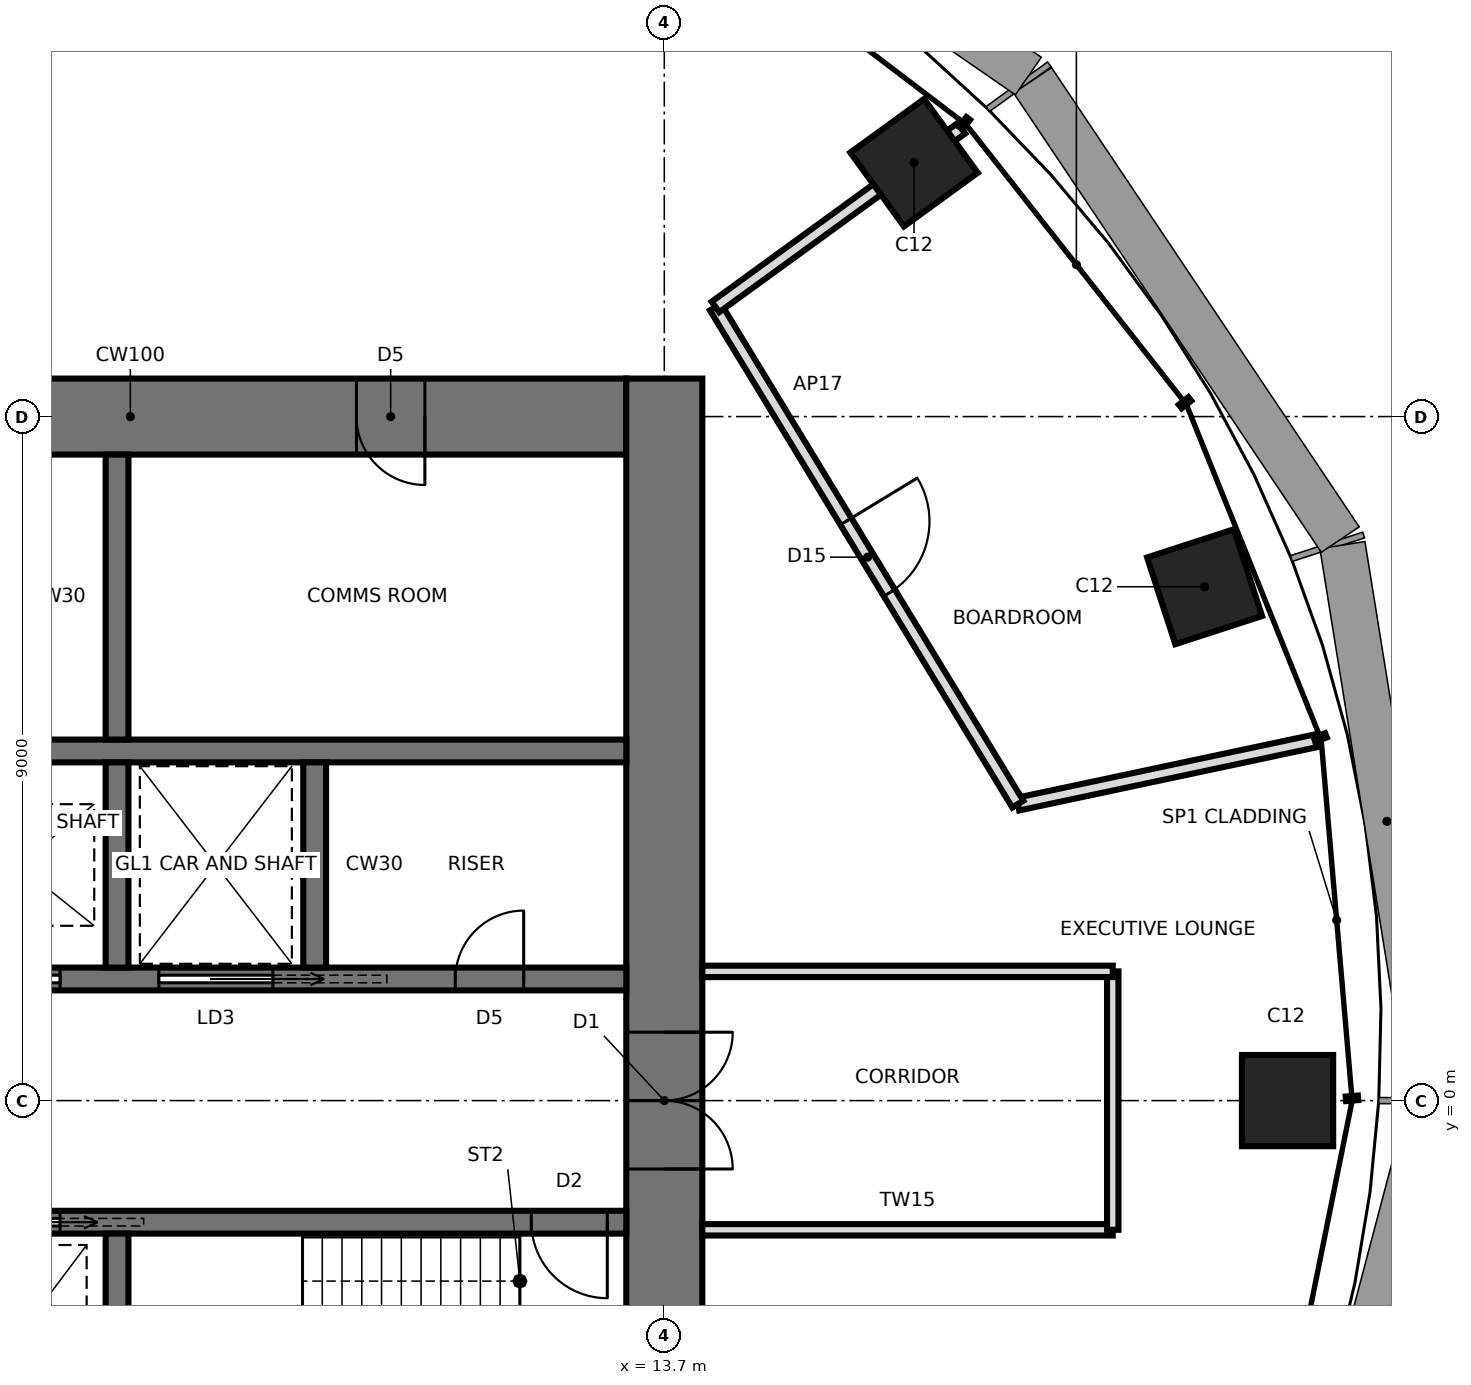
"""IFC4 building model, lengths in metres.
Left out: names, types, materials, properties, quantities, classifications, styles, units other than length and angle.
Written with IfcOpenShell. Run it as: python <this file> out.ifc"""

import sys

from ifc_helpers import new_model, si_unit, direction, frame, frame_2d, origin, origin_2d, place, context, subcontext, project, spatial, rectangle, extrude, element, fill, save


model = new_model("IFC4")
c1 = context("Model", 3, precision=1e-05, world=origin(), true_north=direction((0.0, 1.0)))
c2 = subcontext(c1, "Body", "Model", "MODEL_VIEW")
j1 = project(units=[si_unit("LENGTHUNIT", "METRE"), si_unit("PLANEANGLEUNIT", "RADIAN")], contexts=[c1])
p1 = place(None, origin())
s1 = spatial("IfcSite", under=j1, at=p1, CompositionType="ELEMENT")
p2 = place(p1, origin())
s2 = spatial("IfcBuilding", under=s1, at=p2, CompositionType="ELEMENT")
p3 = place(p2, frame((0.0, 0.0, 256.0)))
s3 = spatial("IfcBuildingStorey", under=s2, at=p3, CompositionType="ELEMENT", Elevation=256.0)
for number, where, z_axis, x_axis in (
    (1, (21.9, 0.0, 0.0), (0.0, 0.0, 1.0), (1.0, 0.0, 0.0)),
    (2, (20.808, 6.761, 0.0), (0.0, 0.0, 1.0), (0.951, 0.309, 0.0)),
    (3, (16.986, 12.341, 0.0), (0.0, 0.0, 1.0), (0.809, 0.588, 0.0)),
):
    element("IfcColumn", number, at=place(p3, frame(where, z_axis=z_axis, x_axis=x_axis)), inside=s3, PredefinedType="COLUMN", context=c2, shape_type="SweptSolid", body=[
        extrude(rectangle(XDim=1.2, YDim=1.2, at=origin_2d()), origin(), (0.0, 0.0, 1.0), 4.2),
    ])
p4 = place(p3, frame((13.2, 9.0, 0.0), z_axis=(0.0, 0.0, 1.0), x_axis=(-1.0, 0.0, 0.0)))
e4 = element("IfcWall", 4, at=p4, inside=s3, PredefinedType="SHEAR", context=c2, shape_type="SweptSolid", body=[
    extrude(rectangle(XDim=26.4, YDim=1.0, at=frame_2d((13.2, 0.0))), origin(), (0.0, 0.0, 1.0), 4.2),
])
p5 = place(p4, frame((2.65, 0.0, 0.0)))
e5 = element("IfcOpeningElement", 5, at=p5, cuts=e4, PredefinedType="OPENING", context=c2, shape_type="SweptSolid", body=[
    extrude(rectangle(XDim=0.9, YDim=2.1, at=frame_2d((0.45, 1.05))), frame((0.0, 0.51, 0.0), z_axis=(0.0, -1.0, 0.0), x_axis=(1.0, 0.0, 0.0)), (0.0, 0.0, 1.0), 1.02),
])
p6 = place(p4, frame((9.5, 0.0, 0.0)))
e6 = element("IfcOpeningElement", 6, at=p6, cuts=e4, PredefinedType="OPENING", context=c2, shape_type="SweptSolid", body=[
    extrude(rectangle(XDim=0.9, YDim=2.1, at=frame_2d((0.45, 1.05))), frame((0.0, 0.51, 0.0), z_axis=(0.0, -1.0, 0.0), x_axis=(1.0, 0.0, 0.0)), (0.0, 0.0, 1.0), 1.02),
])
p7 = place(p4, frame((16.0, 0.0, 0.0)))
e7 = element("IfcOpeningElement", 7, at=p7, cuts=e4, PredefinedType="OPENING", context=c2, shape_type="SweptSolid", body=[
    extrude(rectangle(XDim=0.9, YDim=2.1, at=frame_2d((0.45, 1.05))), frame((0.0, 0.51, 0.0), z_axis=(0.0, -1.0, 0.0), x_axis=(1.0, 0.0, 0.0)), (0.0, 0.0, 1.0), 1.02),
])
p8 = place(p4, frame((21.25, 0.0, 0.0)))
e8 = element("IfcOpeningElement", 8, at=p8, cuts=e4, PredefinedType="OPENING", context=c2, shape_type="SweptSolid", body=[
    extrude(rectangle(XDim=0.9, YDim=2.1, at=frame_2d((0.45, 1.05))), frame((0.0, 0.51, 0.0), z_axis=(0.0, -1.0, 0.0), x_axis=(1.0, 0.0, 0.0)), (0.0, 0.0, 1.0), 1.02),
])
p9 = place(p4, frame((24.8, 0.0, 0.0)))
e9 = element("IfcOpeningElement", 9, at=p9, cuts=e4, PredefinedType="OPENING", context=c2, shape_type="SweptSolid", body=[
    extrude(rectangle(XDim=1.0, YDim=2.1, at=frame_2d((0.5, 1.05))), frame((0.0, 0.51, 0.0), z_axis=(0.0, -1.0, 0.0), x_axis=(1.0, 0.0, 0.0)), (0.0, 0.0, 1.0), 1.02),
])
p10 = place(p3, frame((13.7, -9.5, 0.0), z_axis=(0.0, 0.0, 1.0), x_axis=(0.0, 1.0, 0.0)))
e10 = element("IfcWall", 10, at=p10, inside=s3, PredefinedType="SHEAR", context=c2, shape_type="SweptSolid", body=[
    extrude(rectangle(XDim=19.0, YDim=1.0, at=frame_2d((9.5, 0.0))), origin(), (0.0, 0.0, 1.0), 4.2),
])
p11 = place(p10, frame((8.6, 0.0, 0.0)))
e11 = element("IfcOpeningElement", 11, at=p11, cuts=e10, PredefinedType="OPENING", context=c2, shape_type="SweptSolid", body=[
    extrude(rectangle(XDim=1.8, YDim=2.4, at=frame_2d((0.9, 1.2))), frame((0.0, 0.51, 0.0), z_axis=(0.0, -1.0, 0.0), x_axis=(1.0, 0.0, 0.0)), (0.0, 0.0, 1.0), 1.02),
])
p12 = place(p3, frame((-13.2, 1.6, 0.0), z_axis=(0.0, 0.0, 1.0), x_axis=(1.0, 0.0, 0.0)))
e12 = element("IfcWall", 12, at=p12, inside=s3, PredefinedType="SHEAR", context=c2, shape_type="SweptSolid", body=[
    extrude(rectangle(XDim=26.4, YDim=0.3, at=frame_2d((13.2, 0.0))), origin(), (0.0, 0.0, 1.0), 4.2),
])
p13 = place(p12, frame((0.25, 0.0, 0.0)))
e13 = element("IfcOpeningElement", 13, at=p13, cuts=e12, PredefinedType="OPENING", context=c2, shape_type="SweptSolid", body=[
    extrude(rectangle(XDim=1.0, YDim=2.1, at=frame_2d((0.5, 1.05))), frame((0.0, 0.16, 0.0), z_axis=(0.0, -1.0, 0.0), x_axis=(1.0, 0.0, 0.0)), (0.0, 0.0, 1.0), 0.32),
])
p14 = place(p12, frame((20.25, 0.0, 0.0)))
e14 = element("IfcOpeningElement", 14, at=p14, cuts=e12, PredefinedType="OPENING", context=c2, shape_type="SweptSolid", body=[
    extrude(rectangle(XDim=1.5, YDim=2.4, at=frame_2d((0.75, 1.2))), frame((0.0, 0.16, 0.0), z_axis=(0.0, -1.0, 0.0), x_axis=(1.0, 0.0, 0.0)), (0.0, 0.0, 1.0), 0.32),
])
p15 = place(p12, frame((7.55, 0.0, 0.0)))
e15 = element("IfcOpeningElement", 15, at=p15, cuts=e12, PredefinedType="OPENING", context=c2, shape_type="SweptSolid", body=[
    extrude(rectangle(XDim=0.9, YDim=2.1, at=frame_2d((0.45, 1.05))), frame((0.0, 0.16, 0.0), z_axis=(0.0, -1.0, 0.0), x_axis=(1.0, 0.0, 0.0)), (0.0, 0.0, 1.0), 0.32),
])
p16 = place(p12, frame((10.15, 0.0, 0.0)))
e16 = element("IfcOpeningElement", 16, at=p16, cuts=e12, PredefinedType="OPENING", context=c2, shape_type="SweptSolid", body=[
    extrude(rectangle(XDim=0.9, YDim=2.1, at=frame_2d((0.45, 1.05))), frame((0.0, 0.16, 0.0), z_axis=(0.0, -1.0, 0.0), x_axis=(1.0, 0.0, 0.0)), (0.0, 0.0, 1.0), 0.32),
])
p17 = place(p12, frame((12.75, 0.0, 0.0)))
e17 = element("IfcOpeningElement", 17, at=p17, cuts=e12, PredefinedType="OPENING", context=c2, shape_type="SweptSolid", body=[
    extrude(rectangle(XDim=0.9, YDim=2.1, at=frame_2d((0.45, 1.05))), frame((0.0, 0.16, 0.0), z_axis=(0.0, -1.0, 0.0), x_axis=(1.0, 0.0, 0.0)), (0.0, 0.0, 1.0), 0.32),
])
p18 = place(p12, frame((15.25, 0.0, 0.0)))
e18 = element("IfcOpeningElement", 18, at=p18, cuts=e12, PredefinedType="OPENING", context=c2, shape_type="SweptSolid", body=[
    extrude(rectangle(XDim=1.1, YDim=2.3, at=frame_2d((0.55, 1.15))), frame((0.0, 0.16, 0.0), z_axis=(0.0, -1.0, 0.0), x_axis=(1.0, 0.0, 0.0)), (0.0, 0.0, 1.0), 0.32),
])
p19 = place(p12, frame((17.85, 0.0, 0.0)))
e19 = element("IfcOpeningElement", 19, at=p19, cuts=e12, PredefinedType="OPENING", context=c2, shape_type="SweptSolid", body=[
    extrude(rectangle(XDim=1.1, YDim=2.3, at=frame_2d((0.55, 1.15))), frame((0.0, 0.16, 0.0), z_axis=(0.0, -1.0, 0.0), x_axis=(1.0, 0.0, 0.0)), (0.0, 0.0, 1.0), 0.32),
])
p20 = place(p12, frame((24.15, 0.0, 0.0)))
e20 = element("IfcOpeningElement", 20, at=p20, cuts=e12, PredefinedType="OPENING", context=c2, shape_type="SweptSolid", body=[
    extrude(rectangle(XDim=0.9, YDim=2.1, at=frame_2d((0.45, 1.05))), frame((0.0, 0.16, 0.0), z_axis=(0.0, -1.0, 0.0), x_axis=(1.0, 0.0, 0.0)), (0.0, 0.0, 1.0), 0.32),
])
p21 = place(p3, frame((-13.2, -1.6, 0.0), z_axis=(0.0, 0.0, 1.0), x_axis=(1.0, 0.0, 0.0)))
e21 = element("IfcWall", 21, at=p21, inside=s3, PredefinedType="SHEAR", context=c2, shape_type="SweptSolid", body=[
    extrude(rectangle(XDim=26.4, YDim=0.3, at=frame_2d((13.2, 0.0))), origin(), (0.0, 0.0, 1.0), 4.2),
])
p22 = place(p21, frame((25.15, 0.0, 0.0)))
e22 = element("IfcOpeningElement", 22, at=p22, cuts=e21, PredefinedType="OPENING", context=c2, shape_type="SweptSolid", body=[
    extrude(rectangle(XDim=1.0, YDim=2.1, at=frame_2d((0.5, 1.05))), frame((0.0, 0.16, 0.0), z_axis=(0.0, -1.0, 0.0), x_axis=(1.0, 0.0, 0.0)), (0.0, 0.0, 1.0), 0.32),
])
p23 = place(p21, frame((7.55, 0.0, 0.0)))
e23 = element("IfcOpeningElement", 23, at=p23, cuts=e21, PredefinedType="OPENING", context=c2, shape_type="SweptSolid", body=[
    extrude(rectangle(XDim=0.9, YDim=2.1, at=frame_2d((0.45, 1.05))), frame((0.0, 0.16, 0.0), z_axis=(0.0, -1.0, 0.0), x_axis=(1.0, 0.0, 0.0)), (0.0, 0.0, 1.0), 0.32),
])
p24 = place(p21, frame((10.15, 0.0, 0.0)))
e24 = element("IfcOpeningElement", 24, at=p24, cuts=e21, PredefinedType="OPENING", context=c2, shape_type="SweptSolid", body=[
    extrude(rectangle(XDim=0.9, YDim=2.1, at=frame_2d((0.45, 1.05))), frame((0.0, 0.16, 0.0), z_axis=(0.0, -1.0, 0.0), x_axis=(1.0, 0.0, 0.0)), (0.0, 0.0, 1.0), 0.32),
])
p25 = place(p21, frame((12.75, 0.0, 0.0)))
e25 = element("IfcOpeningElement", 25, at=p25, cuts=e21, PredefinedType="OPENING", context=c2, shape_type="SweptSolid", body=[
    extrude(rectangle(XDim=0.9, YDim=2.1, at=frame_2d((0.45, 1.05))), frame((0.0, 0.16, 0.0), z_axis=(0.0, -1.0, 0.0), x_axis=(1.0, 0.0, 0.0)), (0.0, 0.0, 1.0), 0.32),
])
p26 = place(p21, frame((15.25, 0.0, 0.0)))
e26 = element("IfcOpeningElement", 26, at=p26, cuts=e21, PredefinedType="OPENING", context=c2, shape_type="SweptSolid", body=[
    extrude(rectangle(XDim=1.1, YDim=2.3, at=frame_2d((0.55, 1.15))), frame((0.0, 0.16, 0.0), z_axis=(0.0, -1.0, 0.0), x_axis=(1.0, 0.0, 0.0)), (0.0, 0.0, 1.0), 0.32),
])
p27 = place(p21, frame((17.85, 0.0, 0.0)))
e27 = element("IfcOpeningElement", 27, at=p27, cuts=e21, PredefinedType="OPENING", context=c2, shape_type="SweptSolid", body=[
    extrude(rectangle(XDim=1.1, YDim=2.3, at=frame_2d((0.55, 1.15))), frame((0.0, 0.16, 0.0), z_axis=(0.0, -1.0, 0.0), x_axis=(1.0, 0.0, 0.0)), (0.0, 0.0, 1.0), 0.32),
])
p28 = place(p21, frame((5.55, 0.0, 0.0)))
e28 = element("IfcOpeningElement", 28, at=p28, cuts=e21, PredefinedType="OPENING", context=c2, shape_type="SweptSolid", body=[
    extrude(rectangle(XDim=0.9, YDim=2.1, at=frame_2d((0.45, 1.05))), frame((0.0, 0.16, 0.0), z_axis=(0.0, -1.0, 0.0), x_axis=(1.0, 0.0, 0.0)), (0.0, 0.0, 1.0), 0.32),
])
p29 = place(p3, frame((-13.2, 4.6, 0.0), z_axis=(0.0, 0.0, 1.0), x_axis=(1.0, 0.0, 0.0)))
e29 = element("IfcWall", 29, at=p29, inside=s3, PredefinedType="SHEAR", context=c2, shape_type="SweptSolid", body=[
    extrude(rectangle(XDim=26.4, YDim=0.3, at=frame_2d((13.2, 0.0))), origin(), (0.0, 0.0, 1.0), 4.2),
])
p30 = place(p3, frame((6.5, 1.75, 0.0), z_axis=(0.0, 0.0, 1.0), x_axis=(0.0, 1.0, 0.0)))
e30 = element("IfcWall", 30, at=p30, inside=s3, PredefinedType="SHEAR", context=c2, shape_type="SweptSolid", body=[
    extrude(rectangle(XDim=2.7, YDim=0.3, at=frame_2d((1.35, 0.0))), origin(), (0.0, 0.0, 1.0), 4.2),
])
p31 = place(p3, frame((6.5, 4.75, 0.0), z_axis=(0.0, 0.0, 1.0), x_axis=(0.0, 1.0, 0.0)))
e31 = element("IfcWall", 31, at=p31, inside=s3, PredefinedType="SHEAR", context=c2, shape_type="SweptSolid", body=[
    extrude(rectangle(XDim=3.75, YDim=0.3, at=frame_2d((1.875, 0.0))), origin(), (0.0, 0.0, 1.0), 4.2),
])
for number, where, z_axis, x_axis in (
    (32, (6.5, -1.75, 0.0), (0.0, 0.0, 1.0), (0.0, -1.0, 0.0)),
    (33, (9.1, 1.75, 0.0), (0.0, 0.0, 1.0), (0.0, 1.0, 0.0)),
):
    element("IfcWall", number, at=place(p3, frame(where, z_axis=z_axis, x_axis=x_axis)), inside=s3, PredefinedType="SHEAR", context=c2, shape_type="SweptSolid", body=[
        extrude(rectangle(XDim=2.7, YDim=0.3, at=frame_2d((1.35, 0.0))), origin(), (0.0, 0.0, 1.0), 4.2),
    ])
p32 = place(p3, frame((14.2, -1.7, 0.0), z_axis=(0.0, 0.0, 1.0), x_axis=(1.0, 0.0, 0.0)))
e34 = element("IfcWall", 34, at=p32, inside=s3, PredefinedType="PARTITIONING", context=c2, shape_type="SweptSolid", body=[
    extrude(rectangle(XDim=5.4, YDim=0.15, at=frame_2d((2.7, 0.0))), origin(), (0.0, 0.0, 1.0), 4.04),
])
p33 = place(p3, frame((19.6, -1.7, 0.0), z_axis=(0.0, 0.0, 1.0), x_axis=(0.0, 1.0, 0.0)))
e35 = element("IfcWall", 35, at=p33, inside=s3, PredefinedType="PARTITIONING", context=c2, shape_type="SweptSolid", body=[
    extrude(rectangle(XDim=3.4, YDim=0.15, at=frame_2d((1.7, 0.0))), origin(), (0.0, 0.0, 1.0), 4.04),
])
p34 = place(p3, frame((19.6, 1.7, 0.0), z_axis=(0.0, 0.0, 1.0), x_axis=(-1.0, 0.0, 0.0)))
e36 = element("IfcWall", 36, at=p34, inside=s3, PredefinedType="PARTITIONING", context=c2, shape_type="SweptSolid", body=[
    extrude(rectangle(XDim=5.4, YDim=0.15, at=frame_2d((2.7, 0.0))), origin(), (0.0, 0.0, 1.0), 4.04),
])
p35 = place(p3, frame((18.351, 3.901, 0.0), z_axis=(0.0, 0.0, 1.0), x_axis=(0.978140543132, 0.207944891454, 0.0)))
e37 = element("IfcWall", 37, at=p35, inside=s3, PredefinedType="PARTITIONING", context=c2, shape_type="SweptSolid", body=[
    extrude(rectangle(XDim=4.0, YDim=0.17, at=frame_2d((2.0, 0.0))), origin(), (0.0, 0.0, 1.0), 4.04),
])
p36 = place(p3, frame((14.373, 10.442, 0.0), z_axis=(0.0, 0.0, 1.0), x_axis=(0.519644460078, -0.854382604639, 0.0)))
e38 = element("IfcWall", 38, at=p36, inside=s3, PredefinedType="PARTITIONING", context=c2, shape_type="SweptSolid", body=[
    extrude(rectangle(XDim=7.657, YDim=0.17, at=frame_2d((3.828, 0.0))), origin(), (0.0, 0.0, 1.0), 4.04),
])
p37 = place(p36, frame((3.303, 0.0, 0.0)))
e39 = element("IfcOpeningElement", 39, at=p37, cuts=e38, PredefinedType="OPENING", context=c2, shape_type="SweptSolid", body=[
    extrude(rectangle(XDim=1.1, YDim=2.4, at=frame_2d((0.55, 1.2))), frame((0.0, 0.095, 0.0), z_axis=(0.0, -1.0, 0.0), x_axis=(1.0, 0.0, 0.0)), (0.0, 0.0, 1.0), 0.19),
])
p38 = place(p3, frame((17.609, 12.793, 0.0), z_axis=(0.0, 0.0, 1.0), x_axis=(-0.809026317077, -0.587772420479, 0.0)))
e40 = element("IfcWall", 40, at=p38, inside=s3, PredefinedType="PARTITIONING", context=c2, shape_type="SweptSolid", body=[
    extrude(rectangle(XDim=4.0, YDim=0.17, at=frame_2d((2.0, 0.0))), origin(), (0.0, 0.0, 1.0), 3.24),
])
p39 = place(p11, frame((1.8, 0.0, 0.0), z_axis=(0.0, 0.0, 1.0), x_axis=(-1.0, 0.0, 0.0)))
e41 = element("IfcDoor", 41, at=p39, inside=s3, OperationType="DOUBLE_DOOR_SINGLE_SWING", PredefinedType="DOOR", context=c2, shape_type="SweptSolid", body=[
    extrude(rectangle(XDim=1.72, YDim=2.36, at=frame_2d((0.9, 1.18))), frame((0.0, 0.025, 0.0), z_axis=(0.0, -1.0, 0.0), x_axis=(1.0, 0.0, 0.0)), (0.0, 0.0, 1.0), 0.05),
    extrude(rectangle(XDim=0.04, YDim=2.4, at=frame_2d((1.78, 1.2))), frame((0.0, 0.25, 0.0), z_axis=(0.0, -1.0, 0.0), x_axis=(1.0, 0.0, 0.0)), (0.0, 0.0, 1.0), 0.5),
    extrude(rectangle(XDim=0.04, YDim=2.4, at=frame_2d((0.02, 1.2))), frame((0.0, 0.25, 0.0), z_axis=(0.0, -1.0, 0.0), x_axis=(1.0, 0.0, 0.0)), (0.0, 0.0, 1.0), 0.5),
    extrude(rectangle(XDim=1.72, YDim=0.04, at=frame_2d((0.9, 2.38))), frame((0.0, 0.25, 0.0), z_axis=(0.0, -1.0, 0.0), x_axis=(1.0, 0.0, 0.0)), (0.0, 0.0, 1.0), 0.5),
])
fill(e11, e41)
p40 = place(p22, frame((1.0, 0.0, 0.0), z_axis=(0.0, 0.0, 1.0), x_axis=(-1.0, 0.0, 0.0)))
e42 = element("IfcDoor", 42, at=p40, inside=s3, OperationType="SINGLE_SWING_LEFT", PredefinedType="DOOR", context=c2, shape_type="SweptSolid", body=[
    extrude(rectangle(XDim=1.0, YDim=2.1, at=frame_2d((0.5, 1.05))), frame((0.0, 0.025, 0.0), z_axis=(0.0, -1.0, 0.0), x_axis=(1.0, 0.0, 0.0)), (0.0, 0.0, 1.0), 0.05),
])
fill(e22, e42)
p41 = place(p14, origin())
e43 = element("IfcDoor", 43, at=p41, inside=s3, OperationType="SLIDING_TO_RIGHT", PredefinedType="DOOR", context=c2, shape_type="SweptSolid", body=[
    extrude(rectangle(XDim=1.5, YDim=2.4, at=frame_2d((0.75, 1.2))), frame((0.0, 0.025, 0.0), z_axis=(0.0, -1.0, 0.0), x_axis=(1.0, 0.0, 0.0)), (0.0, 0.0, 1.0), 0.05),
])
fill(e14, e43)
p42 = place(p19, origin())
e44 = element("IfcDoor", 44, at=p42, inside=s3, OperationType="SLIDING_TO_LEFT", PredefinedType="DOOR", context=c2, shape_type="SweptSolid", body=[
    extrude(rectangle(XDim=1.1, YDim=2.3, at=frame_2d((0.55, 1.15))), frame((0.0, 0.025, 0.0), z_axis=(0.0, -1.0, 0.0), x_axis=(1.0, 0.0, 0.0)), (0.0, 0.0, 1.0), 0.05),
])
fill(e19, e44)
p43 = place(p27, frame((1.1, 0.0, 0.0), z_axis=(0.0, 0.0, 1.0), x_axis=(-1.0, 0.0, 0.0)))
e45 = element("IfcDoor", 45, at=p43, inside=s3, OperationType="SLIDING_TO_LEFT", PredefinedType="DOOR", context=c2, shape_type="SweptSolid", body=[
    extrude(rectangle(XDim=1.1, YDim=2.3, at=frame_2d((0.55, 1.15))), frame((0.0, 0.025, 0.0), z_axis=(0.0, -1.0, 0.0), x_axis=(1.0, 0.0, 0.0)), (0.0, 0.0, 1.0), 0.05),
])
fill(e27, e45)
p44 = place(p20, origin())
e46 = element("IfcDoor", 46, at=p44, inside=s3, OperationType="SINGLE_SWING_RIGHT", PredefinedType="DOOR", context=c2, shape_type="SweptSolid", body=[
    extrude(rectangle(XDim=0.9, YDim=2.1, at=frame_2d((0.45, 1.05))), frame((0.0, 0.025, 0.0), z_axis=(0.0, -1.0, 0.0), x_axis=(1.0, 0.0, 0.0)), (0.0, 0.0, 1.0), 0.05),
])
fill(e20, e46)
p45 = place(p5, origin())
e47 = element("IfcDoor", 47, at=p45, inside=s3, OperationType="SINGLE_SWING_LEFT", PredefinedType="DOOR", context=c2, shape_type="SweptSolid", body=[
    extrude(rectangle(XDim=0.82, YDim=2.06, at=frame_2d((0.45, 1.03))), frame((0.0, 0.025, 0.0), z_axis=(0.0, -1.0, 0.0), x_axis=(1.0, 0.0, 0.0)), (0.0, 0.0, 1.0), 0.05),
    extrude(rectangle(XDim=0.04, YDim=2.1, at=frame_2d((0.02, 1.05))), frame((0.0, 0.25, 0.0), z_axis=(0.0, -1.0, 0.0), x_axis=(1.0, 0.0, 0.0)), (0.0, 0.0, 1.0), 0.5),
    extrude(rectangle(XDim=0.04, YDim=2.1, at=frame_2d((0.88, 1.05))), frame((0.0, 0.25, 0.0), z_axis=(0.0, -1.0, 0.0), x_axis=(1.0, 0.0, 0.0)), (0.0, 0.0, 1.0), 0.5),
    extrude(rectangle(XDim=0.82, YDim=0.04, at=frame_2d((0.45, 2.08))), frame((0.0, 0.25, 0.0), z_axis=(0.0, -1.0, 0.0), x_axis=(1.0, 0.0, 0.0)), (0.0, 0.0, 1.0), 0.5),
])
fill(e5, e47)
p46 = place(p37, origin())
e48 = element("IfcDoor", 48, at=p46, inside=s3, OperationType="SINGLE_SWING_LEFT", PredefinedType="DOOR", context=c2, shape_type="SweptSolid", body=[
    extrude(rectangle(XDim=1.1, YDim=2.4, at=frame_2d((0.55, 1.2))), frame((0.0, 0.025, 0.0), z_axis=(0.0, -1.0, 0.0), x_axis=(1.0, 0.0, 0.0)), (0.0, 0.0, 1.0), 0.05),
])
fill(e39, e48)
save(model, sys.argv[1])
